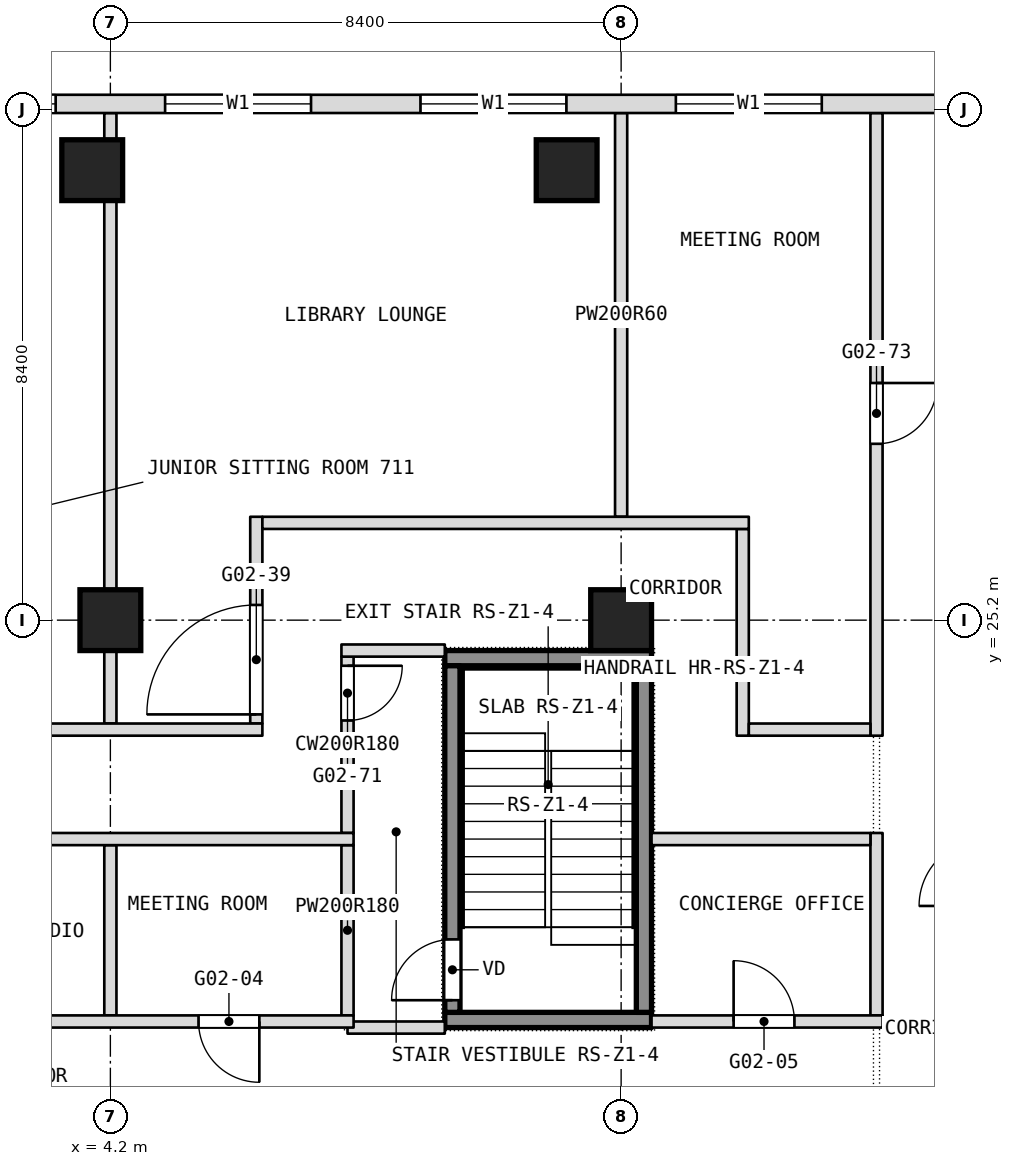
"""IFC4 building model, lengths in metres.
Left out: names, types, materials, properties, quantities, classifications, styles, units other than length and angle.
Written with IfcOpenShell. Run it as: python <this file> out.ifc"""

import sys

from ifc_helpers import new_model, si_unit, direction, frame, frame_2d, origin, origin_2d, place, context, subcontext, project, spatial, rectangle, extrude, element, fill, save


model = new_model("IFC4")
c1 = context("Model", 3, precision=1e-05, world=origin(), true_north=direction((0.0, 1.0)))
c2 = subcontext(c1, "Body", "Model", "MODEL_VIEW")
j1 = project(units=[si_unit("LENGTHUNIT", "METRE"), si_unit("PLANEANGLEUNIT", "RADIAN")], contexts=[c1])
p1 = place(None, origin())
s1 = spatial("IfcSite", under=j1, at=p1, CompositionType="ELEMENT")
p2 = place(p1, origin())
s2 = spatial("IfcBuilding", under=s1, at=p2, CompositionType="ELEMENT")
p3 = place(p2, frame((0.0, 0.0, 40.1)))
s3 = spatial("IfcBuildingStorey", under=s2, at=p3, CompositionType="ELEMENT", Elevation=40.1)
for number, where, z_axis, x_axis in (
    (1, (4.2, 25.2, 0.0), (0.0, 0.0, 1.0), (1.0, 0.0, 0.0)),
    (2, (12.6, 25.2, 0.0), (0.0, 0.0, 1.0), (1.0, 0.0, 0.0)),
    (3, (3.901, 32.6, 0.0), (0.0, 0.0, 1.0), (1.0, 0.0, 0.0)),
    (4, (11.704, 32.6, 0.0), (0.0, 0.0, 1.0), (1.0, 0.0, 0.0)),
):
    element("IfcColumn", number, at=place(p3, frame(where, z_axis=z_axis, x_axis=x_axis)), inside=s3, PredefinedType="COLUMN", context=c2, shape_type="SweptSolid", body=[
        extrude(rectangle(XDim=1.0, YDim=1.0, at=origin_2d()), origin(), (0.0, 0.0, 1.0), 3.6),
    ])
p4 = place(p3, frame((16.8, 18.7, 0.0), z_axis=(0.0, 0.0, 1.0), x_axis=(0.0, 1.0, 0.0)))
e5 = element("IfcWall", 5, at=p4, inside=s3, PredefinedType="PARTITIONING", context=c2, shape_type="SweptSolid", body=[
    extrude(rectangle(XDim=3.0, YDim=0.2, at=frame_2d((1.5, 0.0))), origin(), (0.0, 0.0, 1.0), 3.34),
])
p5 = place(p3, frame((16.8, 23.3, 0.0), z_axis=(0.0, 0.0, 1.0), x_axis=(0.0, 1.0, 0.0)))
e6 = element("IfcWall", 6, at=p5, inside=s3, PredefinedType="PARTITIONING", context=c2, shape_type="SweptSolid", body=[
    extrude(rectangle(XDim=10.24, YDim=0.2, at=frame_2d((5.12, 0.0))), origin(), (0.0, 0.0, 1.0), 3.34),
])
p6 = place(p5, frame((4.8, 0.0, 0.0)))
e7 = element("IfcOpeningElement", 7, at=p6, cuts=e6, PredefinedType="OPENING", context=c2, shape_type="SweptSolid", body=[
    extrude(rectangle(XDim=1.0, YDim=2.1, at=frame_2d((0.5, 1.05))), frame((0.0, 0.1, 0.0), z_axis=(0.0, -1.0, 0.0), x_axis=(1.0, 0.0, 0.0)), (0.0, 0.0, 1.0), 0.2),
])
p7 = place(p3, frame((14.6, 23.3, 0.0), z_axis=(0.0, 0.0, 1.0), x_axis=(0.0, 1.0, 0.0)))
e8 = element("IfcWall", 8, at=p7, inside=s3, PredefinedType="PARTITIONING", context=c2, shape_type="SweptSolid", body=[
    extrude(rectangle(XDim=3.4, YDim=0.2, at=frame_2d((1.7, 0.0))), origin(), (0.0, 0.0, 1.0), 3.34),
])
p8 = place(p3, frame((12.6, 26.9, 0.0), z_axis=(0.0, 0.0, 1.0), x_axis=(0.0, 1.0, 0.0)))
e9 = element("IfcWall", 9, at=p8, inside=s3, PredefinedType="PARTITIONING", context=c2, shape_type="SweptSolid", body=[
    extrude(rectangle(XDim=6.64, YDim=0.2, at=frame_2d((3.32, 0.0))), origin(), (0.0, 0.0, 1.0), 3.34),
])
p9 = place(p3, frame((8.1, 18.7, 0.0), z_axis=(0.0, 0.0, 1.0), x_axis=(0.0, 1.0, 0.0)))
e10 = element("IfcWall", 10, at=p9, inside=s3, PredefinedType="PARTITIONING", context=c2, shape_type="SweptSolid", body=[
    extrude(rectangle(XDim=2.8, YDim=0.2, at=frame_2d((1.4, 0.0))), origin(), (0.0, 0.0, 1.0), 3.34),
])
p10 = place(p3, frame((8.1, 21.7, 0.0), z_axis=(0.0, 0.0, 1.0), x_axis=(0.0, 1.0, 0.0)))
e11 = element("IfcWall", 11, at=p10, inside=s3, PredefinedType="PARTITIONING", context=c2, shape_type="SweptSolid", body=[
    extrude(rectangle(XDim=2.9, YDim=0.2, at=frame_2d((1.45, 0.0))), origin(), (0.0, 0.0, 1.0), 3.34),
])
p11 = place(p10, frame((1.85, 0.0, 0.0)))
e12 = element("IfcOpeningElement", 12, at=p11, cuts=e11, PredefinedType="OPENING", context=c2, shape_type="SweptSolid", body=[
    extrude(rectangle(XDim=0.9, YDim=2.1, at=frame_2d((0.45, 1.05))), frame((0.0, 0.1, 0.0), z_axis=(0.0, -1.0, 0.0), x_axis=(1.0, 0.0, 0.0)), (0.0, 0.0, 1.0), 0.2),
])
p12 = place(p3, frame((6.6, 23.5, 0.0), z_axis=(0.0, 0.0, 1.0), x_axis=(0.0, 1.0, 0.0)))
e13 = element("IfcWall", 13, at=p12, inside=s3, PredefinedType="PARTITIONING", context=c2, shape_type="SweptSolid", body=[
    extrude(rectangle(XDim=3.4, YDim=0.2, at=frame_2d((1.7, 0.0))), origin(), (0.0, 0.0, 1.0), 3.34),
])
p13 = place(p12, frame((0.15, 0.0, 0.0)))
e14 = element("IfcOpeningElement", 14, at=p13, cuts=e13, PredefinedType="OPENING", context=c2, shape_type="SweptSolid", body=[
    extrude(rectangle(XDim=1.8, YDim=2.1, at=frame_2d((0.9, 1.05))), frame((0.0, 0.1, 0.0), z_axis=(0.0, -1.0, 0.0), x_axis=(1.0, 0.0, 0.0)), (0.0, 0.0, 1.0), 0.2),
])
p14 = place(p3, frame((4.2, 18.7, 0.0), z_axis=(0.0, 0.0, 1.0), x_axis=(0.0, 1.0, 0.0)))
e15 = element("IfcWall", 15, at=p14, inside=s3, PredefinedType="PARTITIONING", context=c2, shape_type="SweptSolid", body=[
    extrude(rectangle(XDim=2.8, YDim=0.2, at=frame_2d((1.4, 0.0))), origin(), (0.0, 0.0, 1.0), 3.34),
])
p15 = place(p3, frame((4.2, 23.5, 0.0), z_axis=(0.0, 0.0, 1.0), x_axis=(0.0, 1.0, 0.0)))
e16 = element("IfcWall", 16, at=p15, inside=s3, PredefinedType="PARTITIONING", context=c2, shape_type="SweptSolid", body=[
    extrude(rectangle(XDim=10.04, YDim=0.2, at=frame_2d((5.02, 0.0))), origin(), (0.0, 0.0, 1.0), 3.34),
])
p16 = place(p3, frame((8.1, 18.5, 0.0), z_axis=(0.0, 0.0, 1.0), x_axis=(1.0, 0.0, 0.0)))
e17 = element("IfcWall", 17, at=p16, inside=s3, PredefinedType="PARTITIONING", context=c2, shape_type="SweptSolid", body=[
    extrude(rectangle(XDim=1.6, YDim=0.2, at=frame_2d((0.8, 0.0))), origin(), (0.0, 0.0, 1.0), 3.34),
])
p17 = place(p3, frame((-16.9, 18.6, 0.0), z_axis=(0.0, 0.0, 1.0), x_axis=(1.0, 0.0, 0.0)))
e18 = element("IfcWall", 18, at=p17, inside=s3, PredefinedType="PARTITIONING", context=c2, shape_type="SweptSolid", body=[
    extrude(rectangle(XDim=25.1, YDim=0.2, at=frame_2d((12.55, 0.0))), origin(), (0.0, 0.0, 1.0), 3.34),
])
p18 = place(p17, frame((1.7, 0.0, 0.0)))
e19 = element("IfcOpeningElement", 19, at=p18, cuts=e18, PredefinedType="OPENING", context=c2, shape_type="SweptSolid", body=[
    extrude(rectangle(XDim=1.0, YDim=2.1, at=frame_2d((0.5, 1.05))), frame((0.0, 0.1, 0.0), z_axis=(0.0, -1.0, 0.0), x_axis=(1.0, 0.0, 0.0)), (0.0, 0.0, 1.0), 0.2),
])
p19 = place(p17, frame((7.6, 0.0, 0.0)))
e20 = element("IfcOpeningElement", 20, at=p19, cuts=e18, PredefinedType="OPENING", context=c2, shape_type="SweptSolid", body=[
    extrude(rectangle(XDim=1.8, YDim=2.1, at=frame_2d((0.9, 1.05))), frame((0.0, 0.1, 0.0), z_axis=(0.0, -1.0, 0.0), x_axis=(1.0, 0.0, 0.0)), (0.0, 0.0, 1.0), 0.2),
])
p20 = place(p17, frame((16.0, 0.0, 0.0)))
e21 = element("IfcOpeningElement", 21, at=p20, cuts=e18, PredefinedType="OPENING", context=c2, shape_type="SweptSolid", body=[
    extrude(rectangle(XDim=1.8, YDim=2.1, at=frame_2d((0.9, 1.05))), frame((0.0, 0.1, 0.0), z_axis=(0.0, -1.0, 0.0), x_axis=(1.0, 0.0, 0.0)), (0.0, 0.0, 1.0), 0.2),
])
p21 = place(p17, frame((22.55, 0.0, 0.0)))
e22 = element("IfcOpeningElement", 22, at=p21, cuts=e18, PredefinedType="OPENING", context=c2, shape_type="SweptSolid", body=[
    extrude(rectangle(XDim=1.0, YDim=2.1, at=frame_2d((0.5, 1.05))), frame((0.0, 0.1, 0.0), z_axis=(0.0, -1.0, 0.0), x_axis=(1.0, 0.0, 0.0)), (0.0, 0.0, 1.0), 0.2),
])
p22 = place(p3, frame((13.1, 18.6, 0.0), z_axis=(0.0, 0.0, 1.0), x_axis=(1.0, 0.0, 0.0)))
e23 = element("IfcWall", 23, at=p22, inside=s3, PredefinedType="PARTITIONING", context=c2, shape_type="SweptSolid", body=[
    extrude(rectangle(XDim=3.8, YDim=0.2, at=frame_2d((1.9, 0.0))), origin(), (0.0, 0.0, 1.0), 3.34),
])
p23 = place(p22, frame((1.35, 0.0, 0.0)))
e24 = element("IfcOpeningElement", 24, at=p23, cuts=e23, PredefinedType="OPENING", context=c2, shape_type="SweptSolid", body=[
    extrude(rectangle(XDim=1.0, YDim=2.1, at=frame_2d((0.5, 1.05))), frame((0.0, 0.1, 0.0), z_axis=(0.0, -1.0, 0.0), x_axis=(1.0, 0.0, 0.0)), (0.0, 0.0, 1.0), 0.2),
])
p24 = place(p3, frame((-16.7, 21.6, 0.0), z_axis=(0.0, 0.0, 1.0), x_axis=(1.0, 0.0, 0.0)))
e25 = element("IfcWall", 25, at=p24, inside=s3, PredefinedType="PARTITIONING", context=c2, shape_type="SweptSolid", body=[
    extrude(rectangle(XDim=24.9, YDim=0.2, at=frame_2d((12.45, 0.0))), origin(), (0.0, 0.0, 1.0), 3.34),
])
p25 = place(p3, frame((13.1, 21.6, 0.0), z_axis=(0.0, 0.0, 1.0), x_axis=(1.0, 0.0, 0.0)))
e26 = element("IfcWall", 26, at=p25, inside=s3, PredefinedType="PARTITIONING", context=c2, shape_type="SweptSolid", body=[
    extrude(rectangle(XDim=3.6, YDim=0.2, at=frame_2d((1.8, 0.0))), origin(), (0.0, 0.0, 1.0), 3.34),
])
p26 = place(p3, frame((-16.7, 23.4, 0.0), z_axis=(0.0, 0.0, 1.0), x_axis=(1.0, 0.0, 0.0)))
e27 = element("IfcWall", 27, at=p26, inside=s3, PredefinedType="PARTITIONING", context=c2, shape_type="SweptSolid", body=[
    extrude(rectangle(XDim=23.4, YDim=0.2, at=frame_2d((11.7, 0.0))), origin(), (0.0, 0.0, 1.0), 3.34),
])
p27 = place(p26, frame((2.4, 0.0, 0.0)))
e28 = element("IfcOpeningElement", 28, at=p27, cuts=e27, PredefinedType="OPENING", context=c2, shape_type="SweptSolid", body=[
    extrude(rectangle(XDim=0.9, YDim=2.1, at=frame_2d((0.45, 1.05))), frame((0.0, 0.1, 0.0), z_axis=(0.0, -1.0, 0.0), x_axis=(1.0, 0.0, 0.0)), (0.0, 0.0, 1.0), 0.2),
])
p28 = place(p26, frame((4.9, 0.0, 0.0)))
e29 = element("IfcOpeningElement", 29, at=p28, cuts=e27, PredefinedType="OPENING", context=c2, shape_type="SweptSolid", body=[
    extrude(rectangle(XDim=0.9, YDim=2.1, at=frame_2d((0.45, 1.05))), frame((0.0, 0.1, 0.0), z_axis=(0.0, -1.0, 0.0), x_axis=(1.0, 0.0, 0.0)), (0.0, 0.0, 1.0), 0.2),
])
p29 = place(p26, frame((10.8, 0.0, 0.0)))
e30 = element("IfcOpeningElement", 30, at=p29, cuts=e27, PredefinedType="OPENING", context=c2, shape_type="SweptSolid", body=[
    extrude(rectangle(XDim=0.9, YDim=2.1, at=frame_2d((0.45, 1.05))), frame((0.0, 0.1, 0.0), z_axis=(0.0, -1.0, 0.0), x_axis=(1.0, 0.0, 0.0)), (0.0, 0.0, 1.0), 0.2),
])
p30 = place(p26, frame((18.25, 0.0, 0.0)))
e31 = element("IfcOpeningElement", 31, at=p30, cuts=e27, PredefinedType="OPENING", context=c2, shape_type="SweptSolid", body=[
    extrude(rectangle(XDim=1.1, YDim=2.1, at=frame_2d((0.55, 1.05))), frame((0.0, 0.1, 0.0), z_axis=(0.0, -1.0, 0.0), x_axis=(1.0, 0.0, 0.0)), (0.0, 0.0, 1.0), 0.2),
])
p31 = place(p3, frame((14.7, 23.4, 0.0), z_axis=(0.0, 0.0, 1.0), x_axis=(1.0, 0.0, 0.0)))
e32 = element("IfcWall", 32, at=p31, inside=s3, PredefinedType="PARTITIONING", context=c2, shape_type="SweptSolid", body=[
    extrude(rectangle(XDim=2.0, YDim=0.2, at=frame_2d((1.0, 0.0))), origin(), (0.0, 0.0, 1.0), 3.34),
])
p32 = place(p3, frame((8.0, 24.7, 0.0), z_axis=(0.0, 0.0, 1.0), x_axis=(1.0, 0.0, 0.0)))
e33 = element("IfcWall", 33, at=p32, inside=s3, PredefinedType="PARTITIONING", context=c2, shape_type="SweptSolid", body=[
    extrude(rectangle(XDim=1.7, YDim=0.2, at=frame_2d((0.85, 0.0))), origin(), (0.0, 0.0, 1.0), 3.34),
])
p33 = place(p3, frame((6.7, 26.8, 0.0), z_axis=(0.0, 0.0, 1.0), x_axis=(1.0, 0.0, 0.0)))
e34 = element("IfcWall", 34, at=p33, inside=s3, PredefinedType="PARTITIONING", context=c2, shape_type="SweptSolid", body=[
    extrude(rectangle(XDim=8.0, YDim=0.2, at=frame_2d((4.0, 0.0))), origin(), (0.0, 0.0, 1.0), 3.34),
])
p34 = place(p3, frame((23.406, 33.69, 0.0), z_axis=(0.0, 0.0, 1.0), x_axis=(-1.0, 0.0, 0.0)))
e35 = element("IfcWall", 35, at=p34, inside=s3, PredefinedType="NOTDEFINED", context=c2, shape_type="SweptSolid", body=[
    extrude(rectangle(XDim=46.812, YDim=0.3, at=frame_2d((23.406, 0.0))), origin(), (0.0, 0.0, 1.0), 3.6),
])
p35 = place(p34, frame((2.186, 0.0, 0.9)))
e36 = element("IfcOpeningElement", 36, at=p35, cuts=e35, PredefinedType="OPENING", context=c2, shape_type="SweptSolid", body=[
    extrude(rectangle(XDim=2.4, YDim=2.1, at=frame_2d((1.2, 1.05))), frame((0.0, 0.15, 0.0), z_axis=(0.0, -1.0, 0.0), x_axis=(1.0, 0.0, 0.0)), (0.0, 0.0, 1.0), 0.3),
])
p36 = place(p34, frame((7.506, 0.0, 0.9)))
e37 = element("IfcOpeningElement", 37, at=p36, cuts=e35, PredefinedType="OPENING", context=c2, shape_type="SweptSolid", body=[
    extrude(rectangle(XDim=2.4, YDim=2.1, at=frame_2d((1.2, 1.05))), frame((0.0, 0.15, 0.0), z_axis=(0.0, -1.0, 0.0), x_axis=(1.0, 0.0, 0.0)), (0.0, 0.0, 1.0), 0.3),
])
p37 = place(p34, frame((11.706, 0.0, 0.9)))
e38 = element("IfcOpeningElement", 38, at=p37, cuts=e35, PredefinedType="OPENING", context=c2, shape_type="SweptSolid", body=[
    extrude(rectangle(XDim=2.4, YDim=2.1, at=frame_2d((1.2, 1.05))), frame((0.0, 0.15, 0.0), z_axis=(0.0, -1.0, 0.0), x_axis=(1.0, 0.0, 0.0)), (0.0, 0.0, 1.0), 0.3),
])
p38 = place(p34, frame((15.906, 0.0, 0.9)))
e39 = element("IfcOpeningElement", 39, at=p38, cuts=e35, PredefinedType="OPENING", context=c2, shape_type="SweptSolid", body=[
    extrude(rectangle(XDim=2.4, YDim=2.1, at=frame_2d((1.2, 1.05))), frame((0.0, 0.15, 0.0), z_axis=(0.0, -1.0, 0.0), x_axis=(1.0, 0.0, 0.0)), (0.0, 0.0, 1.0), 0.3),
])
p39 = place(p34, frame((20.106, 0.0, 0.9)))
e40 = element("IfcOpeningElement", 40, at=p39, cuts=e35, PredefinedType="OPENING", context=c2, shape_type="SweptSolid", body=[
    extrude(rectangle(XDim=2.4, YDim=2.1, at=frame_2d((1.2, 1.05))), frame((0.0, 0.15, 0.0), z_axis=(0.0, -1.0, 0.0), x_axis=(1.0, 0.0, 0.0)), (0.0, 0.0, 1.0), 0.3),
])
p40 = place(p34, frame((24.306, 0.0, 0.9)))
e41 = element("IfcOpeningElement", 41, at=p40, cuts=e35, PredefinedType="OPENING", context=c2, shape_type="SweptSolid", body=[
    extrude(rectangle(XDim=2.4, YDim=2.1, at=frame_2d((1.2, 1.05))), frame((0.0, 0.15, 0.0), z_axis=(0.0, -1.0, 0.0), x_axis=(1.0, 0.0, 0.0)), (0.0, 0.0, 1.0), 0.3),
])
p41 = place(p34, frame((28.506, 0.0, 0.9)))
e42 = element("IfcOpeningElement", 42, at=p41, cuts=e35, PredefinedType="OPENING", context=c2, shape_type="SweptSolid", body=[
    extrude(rectangle(XDim=2.4, YDim=2.1, at=frame_2d((1.2, 1.05))), frame((0.0, 0.15, 0.0), z_axis=(0.0, -1.0, 0.0), x_axis=(1.0, 0.0, 0.0)), (0.0, 0.0, 1.0), 0.3),
])
p42 = place(p34, frame((32.706, 0.0, 0.9)))
e43 = element("IfcOpeningElement", 43, at=p42, cuts=e35, PredefinedType="OPENING", context=c2, shape_type="SweptSolid", body=[
    extrude(rectangle(XDim=2.4, YDim=2.1, at=frame_2d((1.2, 1.05))), frame((0.0, 0.15, 0.0), z_axis=(0.0, -1.0, 0.0), x_axis=(1.0, 0.0, 0.0)), (0.0, 0.0, 1.0), 0.3),
])
p43 = place(p34, frame((36.906, 0.0, 0.9)))
e44 = element("IfcOpeningElement", 44, at=p43, cuts=e35, PredefinedType="OPENING", context=c2, shape_type="SweptSolid", body=[
    extrude(rectangle(XDim=2.4, YDim=2.1, at=frame_2d((1.2, 1.05))), frame((0.0, 0.15, 0.0), z_axis=(0.0, -1.0, 0.0), x_axis=(1.0, 0.0, 0.0)), (0.0, 0.0, 1.0), 0.3),
])
p44 = place(p34, frame((42.226, 0.0, 0.9)))
e45 = element("IfcOpeningElement", 45, at=p44, cuts=e35, PredefinedType="OPENING", context=c2, shape_type="SweptSolid", body=[
    extrude(rectangle(XDim=2.4, YDim=2.1, at=frame_2d((1.2, 1.05))), frame((0.0, 0.15, 0.0), z_axis=(0.0, -1.0, 0.0), x_axis=(1.0, 0.0, 0.0)), (0.0, 0.0, 1.0), 0.3),
])
for number, where, z_axis, x_axis in (
    (46, (9.7, 18.625, 0.1), (0.0, 0.0, 1.0), (1.0, 0.0, 0.0)),
    (47, (9.7, 24.575, 0.1), (0.0, 0.0, 1.0), (1.0, 0.0, 0.0)),
):
    element("IfcWall", number, at=place(p3, frame(where, z_axis=z_axis, x_axis=x_axis)), inside=s3, PredefinedType="SHEAR", context=c2, shape_type="SweptSolid", body=[
        extrude(rectangle(XDim=3.4, YDim=0.25, at=frame_2d((1.7, 0.0))), origin(), (0.0, 0.0, 1.0), 3.6),
    ])
p45 = place(p3, frame((9.825, 18.75, 0.1), z_axis=(0.0, 0.0, 1.0), x_axis=(0.0, 1.0, 0.0)))
e48 = element("IfcWall", 48, at=p45, inside=s3, PredefinedType="SHEAR", context=c2, shape_type="SweptSolid", body=[
    extrude(rectangle(XDim=5.7, YDim=0.25, at=frame_2d((2.85, 0.0))), origin(), (0.0, 0.0, 1.0), 3.6),
])
p46 = place(p45, frame((0.2, 0.0, 0.0)))
e49 = element("IfcOpeningElement", 49, at=p46, cuts=e48, PredefinedType="OPENING", context=c2, shape_type="SweptSolid", body=[
    extrude(rectangle(XDim=1.0, YDim=2.1, at=frame_2d((0.5, 1.05))), frame((0.0, 0.125, 0.0), z_axis=(0.0, -1.0, 0.0), x_axis=(1.0, 0.0, 0.0)), (0.0, 0.0, 1.0), 0.25),
])
p47 = place(p3, frame((12.975, 18.75, 0.1), z_axis=(0.0, 0.0, 1.0), x_axis=(0.0, 1.0, 0.0)))
e50 = element("IfcWall", 50, at=p47, inside=s3, PredefinedType="SHEAR", context=c2, shape_type="SweptSolid", body=[
    extrude(rectangle(XDim=5.7, YDim=0.25, at=frame_2d((2.85, 0.0))), origin(), (0.0, 0.0, 1.0), 3.6),
])
p48 = place(p6, origin())
e51 = element("IfcDoor", 51, at=p48, inside=s3, OperationType="SINGLE_SWING_LEFT", PredefinedType="DOOR", context=c2, shape_type="SweptSolid", body=[
    extrude(rectangle(XDim=1.0, YDim=2.1, at=frame_2d((0.5, 1.05))), frame((0.0, 0.025, 0.0), z_axis=(0.0, -1.0, 0.0), x_axis=(1.0, 0.0, 0.0)), (0.0, 0.0, 1.0), 0.05),
])
fill(e7, e51)
p49 = place(p11, origin())
e52 = element("IfcDoor", 52, at=p49, inside=s3, OperationType="SINGLE_SWING_LEFT", PredefinedType="DOOR", context=c2, shape_type="SweptSolid", body=[
    extrude(rectangle(XDim=0.9, YDim=2.1, at=frame_2d((0.45, 1.05))), frame((0.0, 0.025, 0.0), z_axis=(0.0, -1.0, 0.0), x_axis=(1.0, 0.0, 0.0)), (0.0, 0.0, 1.0), 0.05),
])
fill(e12, e52)
p50 = place(p13, origin())
e53 = element("IfcDoor", 53, at=p50, inside=s3, OperationType="DOUBLE_DOOR_SINGLE_SWING", PredefinedType="DOOR", context=c2, shape_type="SweptSolid", body=[
    extrude(rectangle(XDim=1.8, YDim=2.1, at=frame_2d((0.9, 1.05))), frame((0.0, 0.025, 0.0), z_axis=(0.0, -1.0, 0.0), x_axis=(1.0, 0.0, 0.0)), (0.0, 0.0, 1.0), 0.05),
])
fill(e14, e53)
p51 = place(p21, origin())
e54 = element("IfcDoor", 54, at=p51, inside=s3, OperationType="SINGLE_SWING_RIGHT", PredefinedType="DOOR", context=c2, shape_type="SweptSolid", body=[
    extrude(rectangle(XDim=1.0, YDim=2.1, at=frame_2d((0.5, 1.05))), frame((0.0, 0.025, 0.0), z_axis=(0.0, -1.0, 0.0), x_axis=(1.0, 0.0, 0.0)), (0.0, 0.0, 1.0), 0.05),
])
fill(e22, e54)
p52 = place(p23, origin())
e55 = element("IfcDoor", 55, at=p52, inside=s3, OperationType="SINGLE_SWING_LEFT", PredefinedType="DOOR", context=c2, shape_type="SweptSolid", body=[
    extrude(rectangle(XDim=1.0, YDim=2.1, at=frame_2d((0.5, 1.05))), frame((0.0, 0.025, 0.0), z_axis=(0.0, -1.0, 0.0), x_axis=(1.0, 0.0, 0.0)), (0.0, 0.0, 1.0), 0.05),
])
fill(e24, e55)
p53 = place(p36, origin())
e56 = element("IfcWindow", 56, at=p53, inside=s3, PartitioningType="SINGLE_PANEL", PredefinedType="WINDOW", context=c2, shape_type="SweptSolid", body=[
    extrude(rectangle(XDim=2.4, YDim=2.1, at=frame_2d((1.2, 1.05))), frame((0.0, 0.03, 0.0), z_axis=(0.0, -1.0, 0.0), x_axis=(1.0, 0.0, 0.0)), (0.0, 0.0, 1.0), 0.06),
])
fill(e37, e56)
p54 = place(p37, origin())
e57 = element("IfcWindow", 57, at=p54, inside=s3, PartitioningType="SINGLE_PANEL", PredefinedType="WINDOW", context=c2, shape_type="SweptSolid", body=[
    extrude(rectangle(XDim=2.4, YDim=2.1, at=frame_2d((1.2, 1.05))), frame((0.0, 0.03, 0.0), z_axis=(0.0, -1.0, 0.0), x_axis=(1.0, 0.0, 0.0)), (0.0, 0.0, 1.0), 0.06),
])
fill(e38, e57)
p55 = place(p38, origin())
e58 = element("IfcWindow", 58, at=p55, inside=s3, PartitioningType="SINGLE_PANEL", PredefinedType="WINDOW", context=c2, shape_type="SweptSolid", body=[
    extrude(rectangle(XDim=2.4, YDim=2.1, at=frame_2d((1.2, 1.05))), frame((0.0, 0.03, 0.0), z_axis=(0.0, -1.0, 0.0), x_axis=(1.0, 0.0, 0.0)), (0.0, 0.0, 1.0), 0.06),
])
fill(e39, e58)
p56 = place(p39, origin())
e59 = element("IfcWindow", 59, at=p56, inside=s3, PartitioningType="SINGLE_PANEL", PredefinedType="WINDOW", context=c2, shape_type="SweptSolid", body=[
    extrude(rectangle(XDim=2.4, YDim=2.1, at=frame_2d((1.2, 1.05))), frame((0.0, 0.03, 0.0), z_axis=(0.0, -1.0, 0.0), x_axis=(1.0, 0.0, 0.0)), (0.0, 0.0, 1.0), 0.06),
])
fill(e40, e59)
p57 = place(p46, origin())
e60 = element("IfcDoor", 60, at=p57, inside=s3, OperationType="SINGLE_SWING_LEFT", PredefinedType="DOOR", context=c2, shape_type="SweptSolid", body=[
    extrude(rectangle(XDim=1.0, YDim=2.1, at=frame_2d((0.5, 1.05))), frame((0.0, 0.025, 0.0), z_axis=(0.0, -1.0, 0.0), x_axis=(1.0, 0.0, 0.0)), (0.0, 0.0, 1.0), 0.05),
])
fill(e49, e60)
save(model, sys.argv[1])
